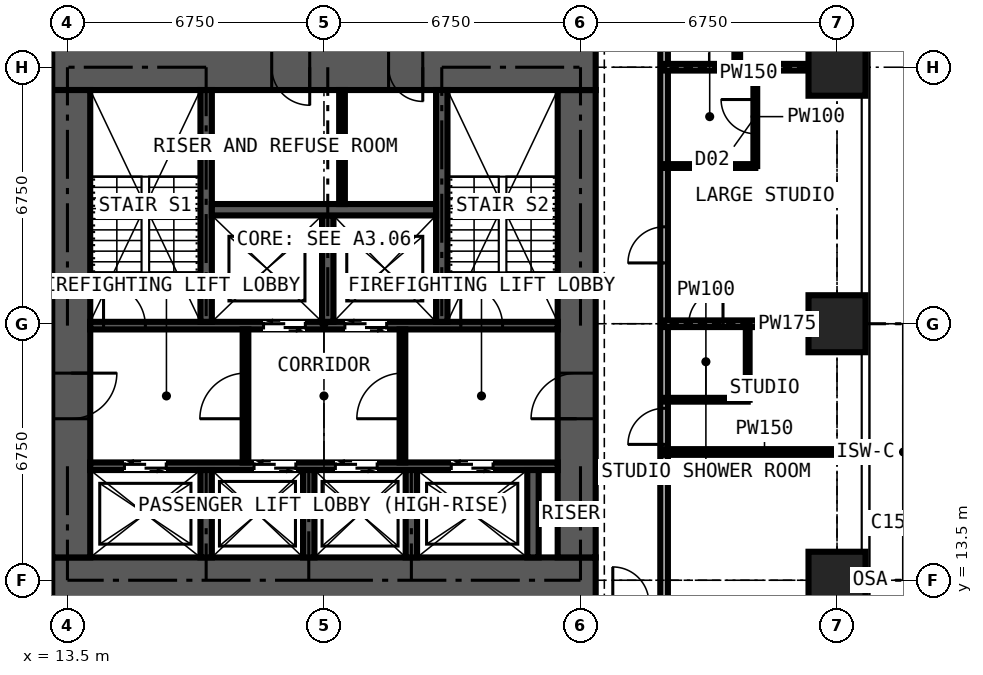
"""IFC4 building model, lengths in metres.
Left out: names, types, materials, properties, quantities, classifications, styles, units other than length and angle.
Written with IfcOpenShell. Run it as: python <this file> out.ifc"""

import sys

from ifc_helpers import new_model, si_unit, direction, frame, frame_2d, origin, origin_2d, place, context, subcontext, project, spatial, rectangle, extrude, element, fill, save


model = new_model("IFC4")
c1 = context("Model", 3, precision=1e-05, world=origin(), true_north=direction((0.0, 1.0)))
c2 = subcontext(c1, "Body", "Model", "MODEL_VIEW")
j1 = project(units=[si_unit("LENGTHUNIT", "METRE"), si_unit("PLANEANGLEUNIT", "RADIAN")], contexts=[c1])
p1 = place(None, origin())
s1 = spatial("IfcSite", under=j1, at=p1, CompositionType="ELEMENT")
p2 = place(p1, origin())
s2 = spatial("IfcBuilding", under=s1, at=p2, CompositionType="ELEMENT")
p3 = place(p2, frame((0.0, 0.0, 153.0)))
s3 = spatial("IfcBuildingStorey", under=s2, at=p3, CompositionType="ELEMENT", Elevation=153.0)
for number, where, z_axis, x_axis in (
    (1, (33.75, 13.5, 0.0), (0.0, 0.0, 1.0), (1.0, 0.0, 0.0)),
    (2, (33.75, 20.25, 0.0), (0.0, 0.0, 1.0), (1.0, 0.0, 0.0)),
    (3, (33.75, 27.0, 0.0), (0.0, 0.0, 1.0), (1.0, 0.0, 0.0)),
):
    element("IfcColumn", number, at=place(p3, frame(where, z_axis=z_axis, x_axis=x_axis)), inside=s3, PredefinedType="COLUMN", context=c2, shape_type="SweptSolid", body=[
        extrude(rectangle(XDim=1.5, YDim=1.5, at=origin_2d()), origin(), (0.0, 0.0, 1.0), 3.6),
    ])
p4 = place(p3, frame((13.1, 13.5, 0.0), z_axis=(0.0, 0.0, 1.0), x_axis=(1.0, 0.0, 0.0)))
e4 = element("IfcWall", 4, at=p4, inside=s3, PredefinedType="SHEAR", context=c2, shape_type="SweptSolid", body=[
    extrude(rectangle(XDim=14.3, YDim=1.2, at=frame_2d((7.15, 0.0))), origin(), (0.0, 0.0, 1.0), 3.6),
])
p5 = place(p3, frame((26.9, 14.1, 0.0), z_axis=(0.0, 0.0, 1.0), x_axis=(0.0, 1.0, 0.0)))
e5 = element("IfcWall", 5, at=p5, inside=s3, PredefinedType="SHEAR", context=c2, shape_type="SweptSolid", body=[
    extrude(rectangle(XDim=12.3, YDim=1.0, at=frame_2d((6.15, 0.0))), origin(), (0.0, 0.0, 1.0), 3.6),
])
p6 = place(p5, frame((3.65, 0.0, 0.0)))
e6 = element("IfcOpeningElement", 6, at=p6, cuts=e5, PredefinedType="OPENING", context=c2, shape_type="SweptSolid", body=[
    extrude(rectangle(XDim=1.2, YDim=2.2, at=frame_2d((0.6, 1.1))), frame((0.0, 0.51, 0.0), z_axis=(0.0, -1.0, 0.0), x_axis=(1.0, 0.0, 0.0)), (0.0, 0.0, 1.0), 1.02),
])
p7 = place(p3, frame((27.4, 27.0, 0.0), z_axis=(0.0, 0.0, 1.0), x_axis=(-1.0, 0.0, 0.0)))
e7 = element("IfcWall", 7, at=p7, inside=s3, PredefinedType="SHEAR", context=c2, shape_type="SweptSolid", body=[
    extrude(rectangle(XDim=14.3, YDim=1.2, at=frame_2d((7.15, 0.0))), origin(), (0.0, 0.0, 1.0), 3.6),
])
p8 = place(p7, frame((4.55, 0.0, 0.0)))
e8 = element("IfcOpeningElement", 8, at=p8, cuts=e7, PredefinedType="OPENING", context=c2, shape_type="SweptSolid", body=[
    extrude(rectangle(XDim=0.9, YDim=2.2, at=frame_2d((0.45, 1.1))), frame((0.0, 0.61, 0.0), z_axis=(0.0, -1.0, 0.0), x_axis=(1.0, 0.0, 0.0)), (0.0, 0.0, 1.0), 1.22),
])
p9 = place(p7, frame((7.525, 0.0, 0.0)))
e9 = element("IfcOpeningElement", 9, at=p9, cuts=e7, PredefinedType="OPENING", context=c2, shape_type="SweptSolid", body=[
    extrude(rectangle(XDim=1.0, YDim=2.2, at=frame_2d((0.5, 1.1))), frame((0.0, 0.61, 0.0), z_axis=(0.0, -1.0, 0.0), x_axis=(1.0, 0.0, 0.0)), (0.0, 0.0, 1.0), 1.22),
])
p10 = place(p3, frame((13.6, 26.4, 0.0), z_axis=(0.0, 0.0, 1.0), x_axis=(0.0, -1.0, 0.0)))
e10 = element("IfcWall", 10, at=p10, inside=s3, PredefinedType="SHEAR", context=c2, shape_type="SweptSolid", body=[
    extrude(rectangle(XDim=12.3, YDim=1.0, at=frame_2d((6.15, 0.0))), origin(), (0.0, 0.0, 1.0), 3.6),
])
p11 = place(p10, frame((7.45, 0.0, 0.0)))
e11 = element("IfcOpeningElement", 11, at=p11, cuts=e10, PredefinedType="OPENING", context=c2, shape_type="SweptSolid", body=[
    extrude(rectangle(XDim=1.2, YDim=2.2, at=frame_2d((0.6, 1.1))), frame((0.0, 0.51, 0.0), z_axis=(0.0, -1.0, 0.0), x_axis=(1.0, 0.0, 0.0)), (0.0, 0.0, 1.0), 1.02),
])
p12 = place(p3, frame((14.1, 16.5, 0.0), z_axis=(0.0, 0.0, 1.0), x_axis=(1.0, 0.0, 0.0)))
e12 = element("IfcWall", 12, at=p12, inside=s3, PredefinedType="SHEAR", context=c2, shape_type="SweptSolid", body=[
    extrude(rectangle(XDim=12.3, YDim=0.2, at=frame_2d((6.15, 0.0))), origin(), (0.0, 0.0, 1.0), 3.6),
])
p13 = place(p12, frame((0.9, 0.0, 0.0)))
e13 = element("IfcOpeningElement", 13, at=p13, cuts=e12, PredefinedType="OPENING", context=c2, shape_type="SweptSolid", body=[
    extrude(rectangle(XDim=1.1, YDim=2.2, at=frame_2d((0.55, 1.1))), frame((0.0, 0.11, 0.0), z_axis=(0.0, -1.0, 0.0), x_axis=(1.0, 0.0, 0.0)), (0.0, 0.0, 1.0), 0.22),
])
p14 = place(p12, frame((4.31, 0.0, 0.0)))
e14 = element("IfcOpeningElement", 14, at=p14, cuts=e12, PredefinedType="OPENING", context=c2, shape_type="SweptSolid", body=[
    extrude(rectangle(XDim=1.1, YDim=2.2, at=frame_2d((0.55, 1.1))), frame((0.0, 0.11, 0.0), z_axis=(0.0, -1.0, 0.0), x_axis=(1.0, 0.0, 0.0)), (0.0, 0.0, 1.0), 0.22),
])
p15 = place(p12, frame((6.45, 0.0, 0.0)))
e15 = element("IfcOpeningElement", 15, at=p15, cuts=e12, PredefinedType="OPENING", context=c2, shape_type="SweptSolid", body=[
    extrude(rectangle(XDim=1.1, YDim=2.2, at=frame_2d((0.55, 1.1))), frame((0.0, 0.11, 0.0), z_axis=(0.0, -1.0, 0.0), x_axis=(1.0, 0.0, 0.0)), (0.0, 0.0, 1.0), 0.22),
])
p16 = place(p12, frame((9.5, 0.0, 0.0)))
e16 = element("IfcOpeningElement", 16, at=p16, cuts=e12, PredefinedType="OPENING", context=c2, shape_type="SweptSolid", body=[
    extrude(rectangle(XDim=1.1, YDim=2.2, at=frame_2d((0.55, 1.1))), frame((0.0, 0.11, 0.0), z_axis=(0.0, -1.0, 0.0), x_axis=(1.0, 0.0, 0.0)), (0.0, 0.0, 1.0), 0.22),
])
p17 = place(p3, frame((14.1, 20.2, 0.0), z_axis=(0.0, 0.0, 1.0), x_axis=(1.0, 0.0, 0.0)))
e17 = element("IfcWall", 17, at=p17, inside=s3, PredefinedType="SHEAR", context=c2, shape_type="SweptSolid", body=[
    extrude(rectangle(XDim=12.3, YDim=0.2, at=frame_2d((6.15, 0.0))), origin(), (0.0, 0.0, 1.0), 3.6),
])
p18 = place(p17, frame((4.56, 0.0, 0.0)))
e18 = element("IfcOpeningElement", 18, at=p18, cuts=e17, PredefinedType="OPENING", context=c2, shape_type="SweptSolid", body=[
    extrude(rectangle(XDim=1.1, YDim=2.2, at=frame_2d((0.55, 1.1))), frame((0.0, 0.11, 0.0), z_axis=(0.0, -1.0, 0.0), x_axis=(1.0, 0.0, 0.0)), (0.0, 0.0, 1.0), 0.22),
])
p19 = place(p17, frame((6.7, 0.0, 0.0)))
e19 = element("IfcOpeningElement", 19, at=p19, cuts=e17, PredefinedType="OPENING", context=c2, shape_type="SweptSolid", body=[
    extrude(rectangle(XDim=1.1, YDim=2.2, at=frame_2d((0.55, 1.1))), frame((0.0, 0.11, 0.0), z_axis=(0.0, -1.0, 0.0), x_axis=(1.0, 0.0, 0.0)), (0.0, 0.0, 1.0), 0.22),
])
p20 = place(p17, frame((0.35, 0.0, 0.0)))
e20 = element("IfcOpeningElement", 20, at=p20, cuts=e17, PredefinedType="OPENING", context=c2, shape_type="SweptSolid", body=[
    extrude(rectangle(XDim=1.1, YDim=2.2, at=frame_2d((0.55, 1.1))), frame((0.0, 0.11, 0.0), z_axis=(0.0, -1.0, 0.0), x_axis=(1.0, 0.0, 0.0)), (0.0, 0.0, 1.0), 0.22),
])
p21 = place(p17, frame((9.75, 0.0, 0.0)))
e21 = element("IfcOpeningElement", 21, at=p21, cuts=e17, PredefinedType="OPENING", context=c2, shape_type="SweptSolid", body=[
    extrude(rectangle(XDim=1.1, YDim=2.2, at=frame_2d((0.55, 1.1))), frame((0.0, 0.11, 0.0), z_axis=(0.0, -1.0, 0.0), x_axis=(1.0, 0.0, 0.0)), (0.0, 0.0, 1.0), 0.22),
])
for number, where, z_axis, x_axis in (
    (22, (17.15, 20.3, 0.0), (0.0, 0.0, 1.0), (0.0, 1.0, 0.0)),
    (23, (23.35, 20.3, 0.0), (0.0, 0.0, 1.0), (0.0, 1.0, 0.0)),
):
    element("IfcWall", number, at=place(p3, frame(where, z_axis=z_axis, x_axis=x_axis)), inside=s3, PredefinedType="SHEAR", context=c2, shape_type="SweptSolid", body=[
        extrude(rectangle(XDim=6.1, YDim=0.3, at=frame_2d((3.05, 0.0))), origin(), (0.0, 0.0, 1.0), 3.6),
    ])
p22 = place(p3, frame((20.35, 20.3, 0.0), z_axis=(0.0, 0.0, 1.0), x_axis=(0.0, 1.0, 0.0)))
e24 = element("IfcWall", 24, at=p22, inside=s3, PredefinedType="SHEAR", context=c2, shape_type="SweptSolid", body=[
    extrude(rectangle(XDim=2.8, YDim=0.3, at=frame_2d((1.4, 0.0))), origin(), (0.0, 0.0, 1.0), 3.6),
])
p23 = place(p3, frame((17.3, 23.25, 0.0), z_axis=(0.0, 0.0, 1.0), x_axis=(1.0, 0.0, 0.0)))
e25 = element("IfcWall", 25, at=p23, inside=s3, PredefinedType="SHEAR", context=c2, shape_type="SweptSolid", body=[
    extrude(rectangle(XDim=5.9, YDim=0.3, at=frame_2d((2.95, 0.0))), origin(), (0.0, 0.0, 1.0), 3.6),
])
for number, where, z_axis, x_axis in (
    (26, (17.15, 14.1, 0.0), (0.0, 0.0, 1.0), (0.0, 1.0, 0.0)),
    (27, (19.85, 14.1, 0.0), (0.0, 0.0, 1.0), (0.0, 1.0, 0.0)),
    (28, (22.55, 14.1, 0.0), (0.0, 0.0, 1.0), (0.0, 1.0, 0.0)),
    (29, (25.75, 14.1, 0.0), (0.0, 0.0, 1.0), (0.0, 1.0, 0.0)),
):
    element("IfcWall", number, at=place(p3, frame(where, z_axis=z_axis, x_axis=x_axis)), inside=s3, PredefinedType="SHEAR", context=c2, shape_type="SweptSolid", body=[
        extrude(rectangle(XDim=2.3, YDim=0.3, at=frame_2d((1.15, 0.0))), origin(), (0.0, 0.0, 1.0), 3.6),
    ])
p24 = place(p3, frame((18.185, 16.6, 0.0), z_axis=(0.0, 0.0, 1.0), x_axis=(0.0, 1.0, 0.0)))
e30 = element("IfcWall", 30, at=p24, inside=s3, PredefinedType="PARTITIONING", context=c2, shape_type="SweptSolid", body=[
    extrude(rectangle(XDim=3.5, YDim=0.15, at=frame_2d((1.75, 0.0))), origin(), (0.0, 0.0, 1.0), 3.375),
])
p25 = place(p24, frame((1.15, 0.0, 0.0)))
e31 = element("IfcOpeningElement", 31, at=p25, cuts=e30, PredefinedType="OPENING", context=c2, shape_type="SweptSolid", body=[
    extrude(rectangle(XDim=1.2, YDim=2.2, at=frame_2d((0.6, 1.1))), frame((0.0, 0.085, 0.0), z_axis=(0.0, -1.0, 0.0), x_axis=(1.0, 0.0, 0.0)), (0.0, 0.0, 1.0), 0.17),
])
p26 = place(p3, frame((22.315, 16.6, 0.0), z_axis=(0.0, 0.0, 1.0), x_axis=(0.0, 1.0, 0.0)))
e32 = element("IfcWall", 32, at=p26, inside=s3, PredefinedType="PARTITIONING", context=c2, shape_type="SweptSolid", body=[
    extrude(rectangle(XDim=3.5, YDim=0.15, at=frame_2d((1.75, 0.0))), origin(), (0.0, 0.0, 1.0), 3.375),
])
p27 = place(p26, frame((1.15, 0.0, 0.0)))
e33 = element("IfcOpeningElement", 33, at=p27, cuts=e32, PredefinedType="OPENING", context=c2, shape_type="SweptSolid", body=[
    extrude(rectangle(XDim=1.2, YDim=2.2, at=frame_2d((0.6, 1.1))), frame((0.0, 0.085, 0.0), z_axis=(0.0, -1.0, 0.0), x_axis=(1.0, 0.0, 0.0)), (0.0, 0.0, 1.0), 0.17),
])
p28 = place(p3, frame((20.725, 23.4, 0.0), z_axis=(0.0, 0.0, 1.0), x_axis=(0.0, 1.0, 0.0)))
e34 = element("IfcWall", 34, at=p28, inside=s3, PredefinedType="PARTITIONING", context=c2, shape_type="SweptSolid", body=[
    extrude(rectangle(XDim=3.0, YDim=0.15, at=frame_2d((1.5, 0.0))), origin(), (0.0, 0.0, 1.0), 3.375),
])
p29 = place(p3, frame((29.2, 11.3, 0.0), z_axis=(0.0, 0.0, 1.0), x_axis=(0.0, 1.0, 0.0)))
e35 = element("IfcWall", 35, at=p29, inside=s3, PredefinedType="PARTITIONING", context=c2, shape_type="SweptSolid", body=[
    extrude(rectangle(XDim=17.9, YDim=0.2, at=frame_2d((8.95, 0.0))), origin(), (0.0, 0.0, 1.0), 3.375),
])
p30 = place(p29, frame((10.55, 0.0, 0.0)))
e36 = element("IfcOpeningElement", 36, at=p30, cuts=e35, PredefinedType="OPENING", context=c2, shape_type="SweptSolid", body=[
    extrude(rectangle(XDim=0.95, YDim=2.2, at=frame_2d((0.475, 1.1))), frame((0.0, 0.11, 0.0), z_axis=(0.0, -1.0, 0.0), x_axis=(1.0, 0.0, 0.0)), (0.0, 0.0, 1.0), 0.22),
])
p31 = place(p29, frame((5.775, 0.0, 0.0)))
e37 = element("IfcOpeningElement", 37, at=p31, cuts=e35, PredefinedType="OPENING", context=c2, shape_type="SweptSolid", body=[
    extrude(rectangle(XDim=0.95, YDim=2.2, at=frame_2d((0.475, 1.1))), frame((0.0, 0.11, 0.0), z_axis=(0.0, -1.0, 0.0), x_axis=(1.0, 0.0, 0.0)), (0.0, 0.0, 1.0), 0.22),
])
p32 = place(p29, frame((16.3, 0.0, 0.0)))
e38 = element("IfcOpeningElement", 38, at=p32, cuts=e35, PredefinedType="OPENING", context=c2, shape_type="SweptSolid", body=[
    extrude(rectangle(XDim=1.0, YDim=2.2, at=frame_2d((0.5, 1.1))), frame((0.0, 0.11, 0.0), z_axis=(0.0, -1.0, 0.0), x_axis=(1.0, 0.0, 0.0)), (0.0, 0.0, 1.0), 0.22),
])
p33 = place(p3, frame((29.2, 16.875, 0.0), z_axis=(0.0, 0.0, 1.0), x_axis=(1.0, 0.0, 0.0)))
e39 = element("IfcWall", 39, at=p33, inside=s3, PredefinedType="PARTITIONING", context=c2, shape_type="SweptSolid", body=[
    extrude(rectangle(XDim=5.284, YDim=0.15, at=frame_2d((2.642, 0.0))), origin(), (0.0, 0.0, 1.0), 3.375),
])
p34 = place(p3, frame((29.2, 18.25, 0.0), z_axis=(0.0, 0.0, 1.0), x_axis=(1.0, 0.0, 0.0)))
e40 = element("IfcWall", 40, at=p34, inside=s3, PredefinedType="PARTITIONING", context=c2, shape_type="SweptSolid", body=[
    extrude(rectangle(XDim=2.2, YDim=0.1, at=frame_2d((1.1, 0.0))), origin(), (0.0, 0.0, 1.0), 3.375),
])
p35 = place(p3, frame((29.2, 20.25, 0.0), z_axis=(0.0, 0.0, 1.0), x_axis=(1.0, 0.0, 0.0)))
e41 = element("IfcWall", 41, at=p35, inside=s3, PredefinedType="PARTITIONING", context=c2, shape_type="SweptSolid", body=[
    extrude(rectangle(XDim=5.284, YDim=0.175, at=frame_2d((2.642, 0.0))), origin(), (0.0, 0.0, 1.0), 2.61),
])
p36 = place(p35, frame((0.65, 0.0, 0.0)))
e42 = element("IfcOpeningElement", 42, at=p36, cuts=e41, PredefinedType="OPENING", context=c2, shape_type="SweptSolid", body=[
    extrude(rectangle(XDim=0.9, YDim=2.2, at=frame_2d((0.45, 1.1))), frame((0.0, 0.097, 0.0), z_axis=(0.0, -1.0, 0.0), x_axis=(1.0, 0.0, 0.0)), (0.0, 0.0, 1.0), 0.195),
])
p37 = place(p3, frame((29.2, 24.4, 0.0), z_axis=(0.0, 0.0, 1.0), x_axis=(1.0, 0.0, 0.0)))
e43 = element("IfcWall", 43, at=p37, inside=s3, PredefinedType="PARTITIONING", context=c2, shape_type="SweptSolid", body=[
    extrude(rectangle(XDim=2.4, YDim=0.1, at=frame_2d((1.2, 0.0))), origin(), (0.0, 0.0, 1.0), 3.375),
])
p38 = place(p3, frame((29.2, 27.0, 0.0), z_axis=(0.0, 0.0, 1.0), x_axis=(1.0, 0.0, 0.0)))
e44 = element("IfcWall", 44, at=p38, inside=s3, PredefinedType="PARTITIONING", context=c2, shape_type="SweptSolid", body=[
    extrude(rectangle(XDim=5.284, YDim=0.175, at=frame_2d((2.642, 0.0))), origin(), (0.0, 0.0, 1.0), 2.806),
])
p39 = place(p3, frame((31.125, 27.0, 0.0), z_axis=(0.0, 0.0, 1.0), x_axis=(0.0, 1.0, 0.0)))
e45 = element("IfcWall", 45, at=p39, inside=s3, PredefinedType="PARTITIONING", context=c2, shape_type="SweptSolid", body=[
    extrude(rectangle(XDim=0.734, YDim=0.15, at=frame_2d((0.367, 0.0))), origin(), (0.0, 0.0, 1.0), 3.375),
])
p40 = place(p3, frame((31.4, 18.25, 0.0), z_axis=(0.0, 0.0, 1.0), x_axis=(0.0, 1.0, 0.0)))
e46 = element("IfcWall", 46, at=p40, inside=s3, PredefinedType="PARTITIONING", context=c2, shape_type="SweptSolid", body=[
    extrude(rectangle(XDim=2.0, YDim=0.1, at=frame_2d((1.0, 0.0))), origin(), (0.0, 0.0, 1.0), 3.375),
])
p41 = place(p3, frame((31.6, 24.4, 0.0), z_axis=(0.0, 0.0, 1.0), x_axis=(0.0, 1.0, 0.0)))
e47 = element("IfcWall", 47, at=p41, inside=s3, PredefinedType="PARTITIONING", context=c2, shape_type="SweptSolid", body=[
    extrude(rectangle(XDim=2.6, YDim=0.1, at=frame_2d((1.3, 0.0))), origin(), (0.0, 0.0, 1.0), 3.375),
])
p42 = place(p41, frame((0.85, 0.0, 0.0)))
e48 = element("IfcOpeningElement", 48, at=p42, cuts=e47, PredefinedType="OPENING", context=c2, shape_type="SweptSolid", body=[
    extrude(rectangle(XDim=0.9, YDim=2.2, at=frame_2d((0.45, 1.1))), frame((0.0, 0.06, 0.0), z_axis=(0.0, -1.0, 0.0), x_axis=(1.0, 0.0, 0.0)), (0.0, 0.0, 1.0), 0.12),
])
p43 = place(p13, origin())
e49 = element("IfcDoor", 49, at=p43, inside=s3, OperationType="DOUBLE_DOOR_SLIDING", PredefinedType="DOOR", context=c2, shape_type="SweptSolid", body=[
    extrude(rectangle(XDim=1.1, YDim=2.2, at=frame_2d((0.55, 1.1))), frame((0.0, 0.025, 0.0), z_axis=(0.0, -1.0, 0.0), x_axis=(1.0, 0.0, 0.0)), (0.0, 0.0, 1.0), 0.05),
])
fill(e13, e49)
p44 = place(p14, origin())
e50 = element("IfcDoor", 50, at=p44, inside=s3, OperationType="DOUBLE_DOOR_SLIDING", PredefinedType="DOOR", context=c2, shape_type="SweptSolid", body=[
    extrude(rectangle(XDim=1.1, YDim=2.2, at=frame_2d((0.55, 1.1))), frame((0.0, 0.025, 0.0), z_axis=(0.0, -1.0, 0.0), x_axis=(1.0, 0.0, 0.0)), (0.0, 0.0, 1.0), 0.05),
])
fill(e14, e50)
p45 = place(p15, origin())
e51 = element("IfcDoor", 51, at=p45, inside=s3, OperationType="DOUBLE_DOOR_SLIDING", PredefinedType="DOOR", context=c2, shape_type="SweptSolid", body=[
    extrude(rectangle(XDim=1.1, YDim=2.2, at=frame_2d((0.55, 1.1))), frame((0.0, 0.025, 0.0), z_axis=(0.0, -1.0, 0.0), x_axis=(1.0, 0.0, 0.0)), (0.0, 0.0, 1.0), 0.05),
])
fill(e15, e51)
p46 = place(p16, origin())
e52 = element("IfcDoor", 52, at=p46, inside=s3, OperationType="DOUBLE_DOOR_SLIDING", PredefinedType="DOOR", context=c2, shape_type="SweptSolid", body=[
    extrude(rectangle(XDim=1.1, YDim=2.2, at=frame_2d((0.55, 1.1))), frame((0.0, 0.025, 0.0), z_axis=(0.0, -1.0, 0.0), x_axis=(1.0, 0.0, 0.0)), (0.0, 0.0, 1.0), 0.05),
])
fill(e16, e52)
p47 = place(p18, origin())
e53 = element("IfcDoor", 53, at=p47, inside=s3, OperationType="DOUBLE_DOOR_SLIDING", PredefinedType="DOOR", context=c2, shape_type="SweptSolid", body=[
    extrude(rectangle(XDim=1.1, YDim=2.2, at=frame_2d((0.55, 1.1))), frame((0.0, 0.025, 0.0), z_axis=(0.0, -1.0, 0.0), x_axis=(1.0, 0.0, 0.0)), (0.0, 0.0, 1.0), 0.05),
])
fill(e18, e53)
p48 = place(p19, origin())
e54 = element("IfcDoor", 54, at=p48, inside=s3, OperationType="DOUBLE_DOOR_SLIDING", PredefinedType="DOOR", context=c2, shape_type="SweptSolid", body=[
    extrude(rectangle(XDim=1.1, YDim=2.2, at=frame_2d((0.55, 1.1))), frame((0.0, 0.025, 0.0), z_axis=(0.0, -1.0, 0.0), x_axis=(1.0, 0.0, 0.0)), (0.0, 0.0, 1.0), 0.05),
])
fill(e19, e54)
p49 = place(p11, origin())
e55 = element("IfcDoor", 55, at=p49, inside=s3, OperationType="DOUBLE_DOOR_SINGLE_SWING", PredefinedType="DOOR", context=c2, shape_type="SweptSolid", body=[
    extrude(rectangle(XDim=1.2, YDim=2.2, at=frame_2d((0.6, 1.1))), frame((0.0, 0.025, 0.0), z_axis=(0.0, -1.0, 0.0), x_axis=(1.0, 0.0, 0.0)), (0.0, 0.0, 1.0), 0.05),
])
fill(e11, e55)
p50 = place(p6, origin())
e56 = element("IfcDoor", 56, at=p50, inside=s3, OperationType="DOUBLE_DOOR_SINGLE_SWING", PredefinedType="DOOR", context=c2, shape_type="SweptSolid", body=[
    extrude(rectangle(XDim=1.2, YDim=2.2, at=frame_2d((0.6, 1.1))), frame((0.0, 0.025, 0.0), z_axis=(0.0, -1.0, 0.0), x_axis=(1.0, 0.0, 0.0)), (0.0, 0.0, 1.0), 0.05),
])
fill(e6, e56)
p51 = place(p25, origin())
e57 = element("IfcDoor", 57, at=p51, inside=s3, OperationType="DOUBLE_DOOR_SINGLE_SWING", PredefinedType="DOOR", context=c2, shape_type="SweptSolid", body=[
    extrude(rectangle(XDim=1.2, YDim=2.2, at=frame_2d((0.6, 1.1))), frame((0.0, 0.025, 0.0), z_axis=(0.0, -1.0, 0.0), x_axis=(1.0, 0.0, 0.0)), (0.0, 0.0, 1.0), 0.05),
])
fill(e31, e57)
p52 = place(p27, origin())
e58 = element("IfcDoor", 58, at=p52, inside=s3, OperationType="DOUBLE_DOOR_SINGLE_SWING", PredefinedType="DOOR", context=c2, shape_type="SweptSolid", body=[
    extrude(rectangle(XDim=1.2, YDim=2.2, at=frame_2d((0.6, 1.1))), frame((0.0, 0.025, 0.0), z_axis=(0.0, -1.0, 0.0), x_axis=(1.0, 0.0, 0.0)), (0.0, 0.0, 1.0), 0.05),
])
fill(e33, e58)
p53 = place(p8, origin())
e59 = element("IfcDoor", 59, at=p53, inside=s3, OperationType="SINGLE_SWING_LEFT", PredefinedType="DOOR", context=c2, shape_type="SweptSolid", body=[
    extrude(rectangle(XDim=0.9, YDim=2.2, at=frame_2d((0.45, 1.1))), frame((0.0, 0.4, 0.0), z_axis=(0.0, -1.0, 0.0), x_axis=(1.0, 0.0, 0.0)), (0.0, 0.0, 1.0), 0.8),
])
fill(e8, e59)
p54 = place(p9, origin())
e60 = element("IfcDoor", 60, at=p54, inside=s3, OperationType="SINGLE_SWING_LEFT", PredefinedType="DOOR", context=c2, shape_type="SweptSolid", body=[
    extrude(rectangle(XDim=1.0, YDim=2.2, at=frame_2d((0.5, 1.1))), frame((0.0, 0.025, 0.0), z_axis=(0.0, -1.0, 0.0), x_axis=(1.0, 0.0, 0.0)), (0.0, 0.0, 1.0), 0.05),
])
fill(e9, e60)
p55 = place(p20, origin())
e61 = element("IfcDoor", 61, at=p55, inside=s3, OperationType="SINGLE_SWING_LEFT", PredefinedType="DOOR", context=c2, shape_type="SweptSolid", body=[
    extrude(rectangle(XDim=1.1, YDim=2.2, at=frame_2d((0.55, 1.1))), frame((0.0, 0.025, 0.0), z_axis=(0.0, -1.0, 0.0), x_axis=(1.0, 0.0, 0.0)), (0.0, 0.0, 1.0), 0.05),
])
fill(e20, e61)
p56 = place(p21, origin())
e62 = element("IfcDoor", 62, at=p56, inside=s3, OperationType="SINGLE_SWING_LEFT", PredefinedType="DOOR", context=c2, shape_type="SweptSolid", body=[
    extrude(rectangle(XDim=1.1, YDim=2.2, at=frame_2d((0.55, 1.1))), frame((0.0, 0.025, 0.0), z_axis=(0.0, -1.0, 0.0), x_axis=(1.0, 0.0, 0.0)), (0.0, 0.0, 1.0), 0.05),
])
fill(e21, e62)
p57 = place(p30, origin())
e63 = element("IfcDoor", 63, at=p57, inside=s3, OperationType="SINGLE_SWING_LEFT", PredefinedType="DOOR", context=c2, shape_type="SweptSolid", body=[
    extrude(rectangle(XDim=0.95, YDim=2.2, at=frame_2d((0.475, 1.1))), frame((0.0, 0.025, 0.0), z_axis=(0.0, -1.0, 0.0), x_axis=(1.0, 0.0, 0.0)), (0.0, 0.0, 1.0), 0.05),
])
fill(e36, e63)
p58 = place(p42, origin())
e64 = element("IfcDoor", 64, at=p58, inside=s3, OperationType="SINGLE_SWING_RIGHT", PredefinedType="DOOR", context=c2, shape_type="SweptSolid", body=[
    extrude(rectangle(XDim=0.9, YDim=2.2, at=frame_2d((0.45, 1.1))), frame((0.0, 0.025, 0.0), z_axis=(0.0, -1.0, 0.0), x_axis=(1.0, 0.0, 0.0)), (0.0, 0.0, 1.0), 0.05),
])
fill(e48, e64)
p59 = place(p31, origin())
e65 = element("IfcDoor", 65, at=p59, inside=s3, OperationType="SINGLE_SWING_LEFT", PredefinedType="DOOR", context=c2, shape_type="SweptSolid", body=[
    extrude(rectangle(XDim=0.95, YDim=2.2, at=frame_2d((0.475, 1.1))), frame((0.0, 0.025, 0.0), z_axis=(0.0, -1.0, 0.0), x_axis=(1.0, 0.0, 0.0)), (0.0, 0.0, 1.0), 0.05),
])
fill(e37, e65)
p60 = place(p36, origin())
e66 = element("IfcDoor", 66, at=p60, inside=s3, OperationType="SINGLE_SWING_RIGHT", PredefinedType="DOOR", context=c2, shape_type="SweptSolid", body=[
    extrude(rectangle(XDim=0.9, YDim=2.2, at=frame_2d((0.45, 1.1))), frame((0.0, 0.025, 0.0), z_axis=(0.0, -1.0, 0.0), x_axis=(1.0, 0.0, 0.0)), (0.0, 0.0, 1.0), 0.05),
])
fill(e42, e66)
save(model, sys.argv[1])
